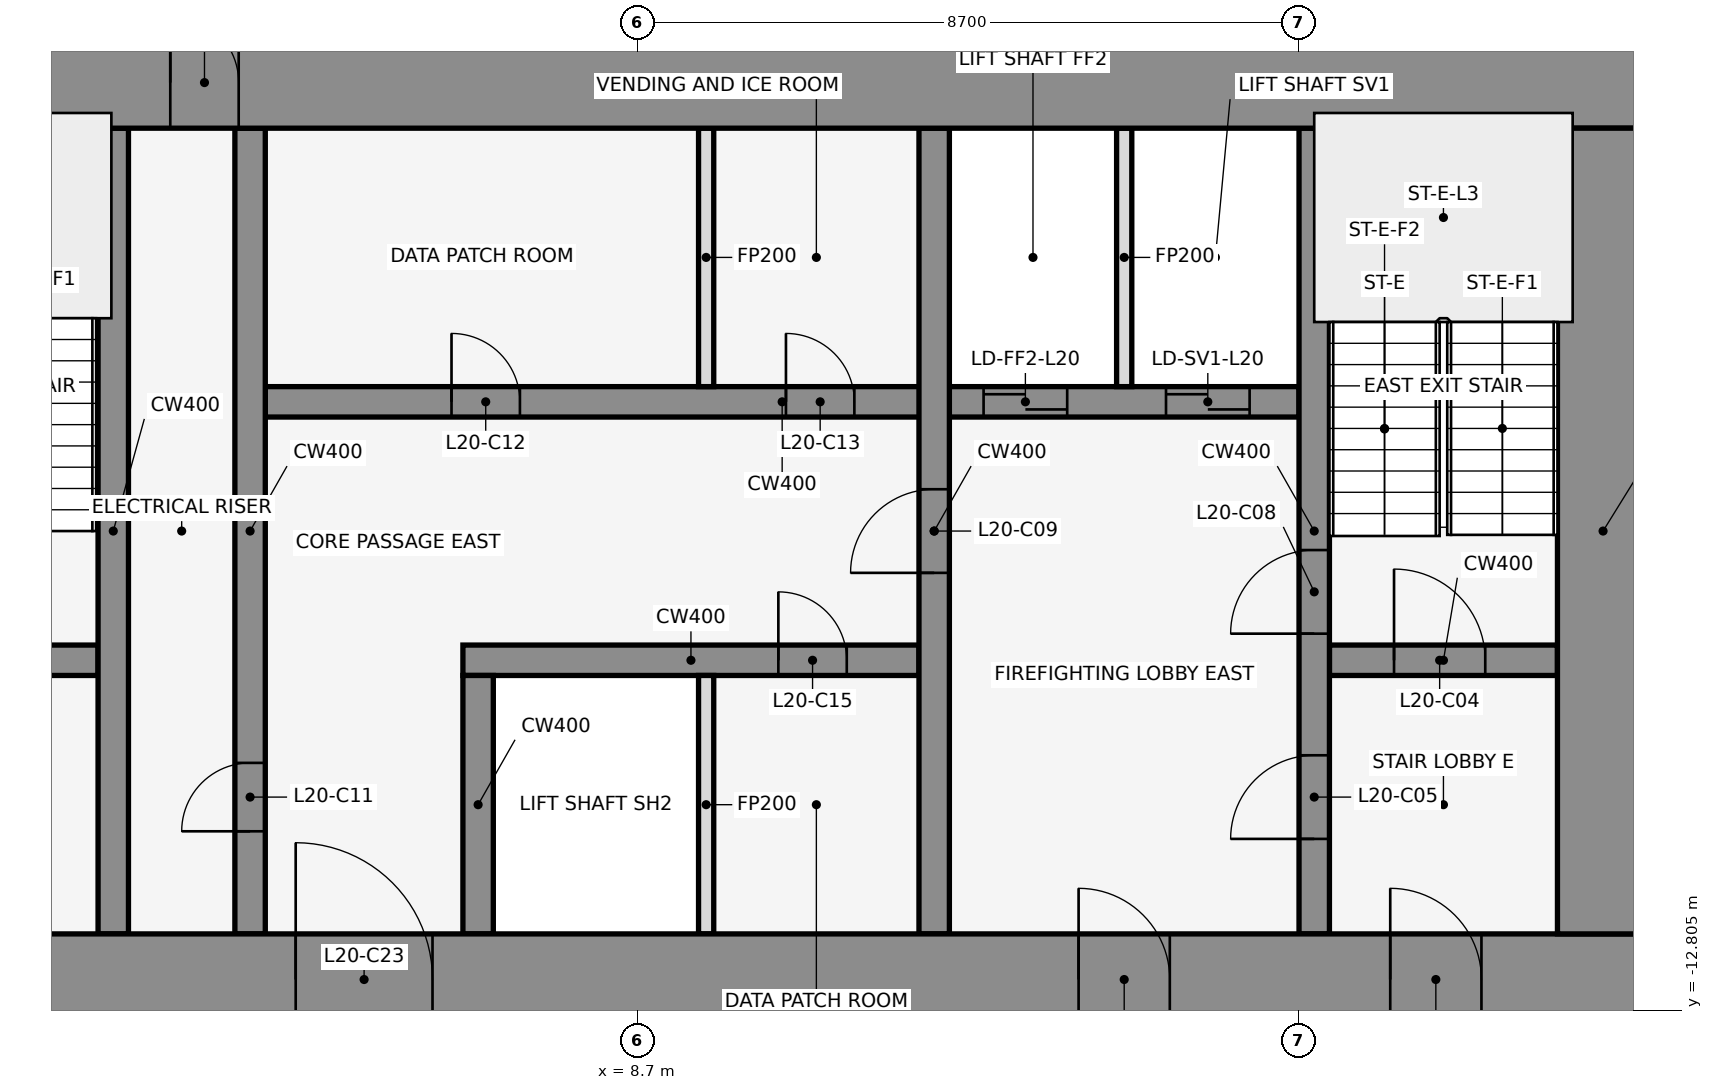
"""IFC4 building model, lengths in metres.
Left out: names, types, materials, properties, quantities, classifications, styles, units other than length and angle.
Written with IfcOpenShell. Run it as: python <this file> out.ifc"""

import sys

from ifc_helpers import new_model, si_unit, direction, frame, frame_2d, origin, place, context, subcontext, project, spatial, rectangle, extrude, element, fill, save


model = new_model("IFC4")
c1 = context("Model", 3, precision=1e-05, world=origin(), true_north=direction((0.0, 1.0)))
c2 = subcontext(c1, "Body", "Model", "MODEL_VIEW")
j1 = project(units=[si_unit("LENGTHUNIT", "METRE"), si_unit("PLANEANGLEUNIT", "RADIAN")], contexts=[c1])
p1 = place(None, origin())
s1 = spatial("IfcSite", under=j1, at=p1, CompositionType="ELEMENT")
p2 = place(p1, origin())
s2 = spatial("IfcBuilding", under=s1, at=p2, CompositionType="ELEMENT")
p3 = place(p2, frame((0.0, 0.0, 98.1)))
s3 = spatial("IfcBuildingStorey", under=s2, at=p3, CompositionType="ELEMENT", Elevation=98.1)
for number, where, z_axis, x_axis in (
    (1, (16.432, -0.105, 0.0), (0.0, 0.0, 1.0), (-0.84, 0.543, 0.0)),
    (2, (1.901, 1.08, 0.0), (0.0, 0.0, 1.0), (-0.84, -0.543, 0.0)),
):
    element("IfcWall", number, at=place(p3, frame(where, z_axis=z_axis, x_axis=x_axis)), inside=s3, PredefinedType="STANDARD", context=c2, shape_type="SweptSolid", body=[
        extrude(rectangle(XDim=2.183, YDim=0.25, at=frame_2d((1.091, 0.0))), origin(), (0.0, 0.0, 1.0), 3.95),
    ])
p4 = place(p3, frame((-1.6, -8.2, 0.0), z_axis=(0.0, 0.0, 1.0), x_axis=(1.0, 0.0, 0.0)))
e3 = element("IfcWall", 3, at=p4, inside=s3, PredefinedType="SHEAR", context=c2, shape_type="SweptSolid", body=[
    extrude(rectangle(XDim=3.2, YDim=0.4, at=frame_2d((1.6, 0.0))), origin(), (0.0, 0.0, 1.0), 4.1),
])
p5 = place(p4, frame((1.05, 0.0, 0.0)))
e4 = element("IfcOpeningElement", 4, at=p5, cuts=e3, PredefinedType="OPENING", context=c2, shape_type="SweptSolid", body=[
    extrude(rectangle(XDim=1.2, YDim=2.1, at=frame_2d((0.6, 1.05))), frame((0.0, 0.212, 0.0), z_axis=(0.0, -1.0, 0.0), x_axis=(1.0, 0.0, 0.0)), (0.0, 0.0, 1.0), 0.424),
])
p6 = place(p3, frame((6.4, -8.2, 0.0), z_axis=(0.0, 0.0, 1.0), x_axis=(1.0, 0.0, 0.0)))
e5 = element("IfcWall", 5, at=p6, inside=s3, PredefinedType="SHEAR", context=c2, shape_type="SweptSolid", body=[
    extrude(rectangle(XDim=6.0, YDim=0.4, at=frame_2d((3.0, 0.0))), origin(), (0.0, 0.0, 1.0), 4.1),
])
p7 = place(p6, frame((4.15, 0.0, 0.0)))
e6 = element("IfcOpeningElement", 6, at=p7, cuts=e5, PredefinedType="OPENING", context=c2, shape_type="SweptSolid", body=[
    extrude(rectangle(XDim=0.9, YDim=2.1, at=frame_2d((0.45, 1.05))), frame((0.0, 0.212, 0.0), z_axis=(0.0, -1.0, 0.0), x_axis=(1.0, 0.0, 0.0)), (0.0, 0.0, 1.0), 0.424),
])
p8 = place(p3, frame((17.8, -8.2, 0.0), z_axis=(0.0, 0.0, 1.0), x_axis=(1.0, 0.0, 0.0)))
e7 = element("IfcWall", 7, at=p8, inside=s3, PredefinedType="SHEAR", context=c2, shape_type="SweptSolid", body=[
    extrude(rectangle(XDim=3.0, YDim=0.4, at=frame_2d((1.5, 0.0))), origin(), (0.0, 0.0, 1.0), 4.1),
])
p9 = place(p8, frame((0.85, 0.0, 0.0)))
e8 = element("IfcOpeningElement", 8, at=p9, cuts=e7, PredefinedType="OPENING", context=c2, shape_type="SweptSolid", body=[
    extrude(rectangle(XDim=1.2, YDim=2.1, at=frame_2d((0.6, 1.05))), frame((0.0, 0.212, 0.0), z_axis=(0.0, -1.0, 0.0), x_axis=(1.0, 0.0, 0.0)), (0.0, 0.0, 1.0), 0.424),
])
p10 = place(p3, frame((3.8, -4.8, 0.0), z_axis=(0.0, 0.0, 1.0), x_axis=(1.0, 0.0, 0.0)))
e9 = element("IfcWall", 9, at=p10, inside=s3, PredefinedType="SHEAR", context=c2, shape_type="SweptSolid", body=[
    extrude(rectangle(XDim=13.6, YDim=0.4, at=frame_2d((6.8, 0.0))), origin(), (0.0, 0.0, 1.0), 4.1),
])
p11 = place(p10, frame((9.45, 0.0, 0.0)))
e10 = element("IfcOpeningElement", 10, at=p11, cuts=e9, PredefinedType="OPENING", context=c2, shape_type="SweptSolid", body=[
    extrude(rectangle(XDim=1.1, YDim=2.1, at=frame_2d((0.55, 1.05))), frame((0.0, 0.212, 0.0), z_axis=(0.0, -1.0, 0.0), x_axis=(1.0, 0.0, 0.0)), (0.0, 0.0, 1.0), 0.424),
])
p12 = place(p10, frame((11.85, 0.0, 0.0)))
e11 = element("IfcOpeningElement", 11, at=p12, cuts=e9, PredefinedType="OPENING", context=c2, shape_type="SweptSolid", body=[
    extrude(rectangle(XDim=1.1, YDim=2.1, at=frame_2d((0.55, 1.05))), frame((0.0, 0.212, 0.0), z_axis=(0.0, -1.0, 0.0), x_axis=(1.0, 0.0, 0.0)), (0.0, 0.0, 1.0), 0.424),
])
p13 = place(p10, frame((2.45, 0.0, 0.0)))
e12 = element("IfcOpeningElement", 12, at=p13, cuts=e9, PredefinedType="OPENING", context=c2, shape_type="SweptSolid", body=[
    extrude(rectangle(XDim=0.9, YDim=2.1, at=frame_2d((0.45, 1.05))), frame((0.0, 0.212, 0.0), z_axis=(0.0, -1.0, 0.0), x_axis=(1.0, 0.0, 0.0)), (0.0, 0.0, 1.0), 0.424),
])
p14 = place(p10, frame((6.85, 0.0, 0.0)))
e13 = element("IfcOpeningElement", 13, at=p14, cuts=e9, PredefinedType="OPENING", context=c2, shape_type="SweptSolid", body=[
    extrude(rectangle(XDim=0.9, YDim=2.1, at=frame_2d((0.45, 1.05))), frame((0.0, 0.212, 0.0), z_axis=(0.0, -1.0, 0.0), x_axis=(1.0, 0.0, 0.0)), (0.0, 0.0, 1.0), 0.424),
])
p15 = place(p3, frame((1.8, -11.8, 0.0), z_axis=(0.0, 0.0, 1.0), x_axis=(0.0, 1.0, 0.0)))
e14 = element("IfcWall", 14, at=p15, inside=s3, PredefinedType="SHEAR", context=c2, shape_type="SweptSolid", body=[
    extrude(rectangle(XDim=10.6, YDim=0.4, at=frame_2d((5.3, 0.0))), origin(), (0.0, 0.0, 1.0), 4.1),
])
p16 = place(p3, frame((3.6, -11.8, 0.0), z_axis=(0.0, 0.0, 1.0), x_axis=(0.0, 1.0, 0.0)))
e15 = element("IfcWall", 15, at=p16, inside=s3, PredefinedType="SHEAR", context=c2, shape_type="SweptSolid", body=[
    extrude(rectangle(XDim=10.6, YDim=0.4, at=frame_2d((5.3, 0.0))), origin(), (0.0, 0.0, 1.0), 4.1),
])
p17 = place(p16, frame((1.35, 0.0, 0.0)))
e16 = element("IfcOpeningElement", 16, at=p17, cuts=e15, PredefinedType="OPENING", context=c2, shape_type="SweptSolid", body=[
    extrude(rectangle(XDim=0.9, YDim=2.1, at=frame_2d((0.45, 1.05))), frame((0.0, 0.212, 0.0), z_axis=(0.0, -1.0, 0.0), x_axis=(1.0, 0.0, 0.0)), (0.0, 0.0, 1.0), 0.424),
])
p18 = place(p3, frame((6.6, -11.8, 0.0), z_axis=(0.0, 0.0, 1.0), x_axis=(0.0, 1.0, 0.0)))
e17 = element("IfcWall", 17, at=p18, inside=s3, PredefinedType="SHEAR", context=c2, shape_type="SweptSolid", body=[
    extrude(rectangle(XDim=3.4, YDim=0.4, at=frame_2d((1.7, 0.0))), origin(), (0.0, 0.0, 1.0), 4.1),
])
for number, where, z_axis, x_axis in (
    (18, (9.6, -11.8, 0.0), (0.0, 0.0, 1.0), (0.0, 1.0, 0.0)),
    (19, (9.6, -4.6, 0.0), (0.0, 0.0, 1.0), (0.0, 1.0, 0.0)),
):
    element("IfcWall", number, at=place(p3, frame(where, z_axis=z_axis, x_axis=x_axis)), inside=s3, PredefinedType="PARTITIONING", context=c2, shape_type="SweptSolid", body=[
        extrude(rectangle(XDim=3.4, YDim=0.2, at=frame_2d((1.7, 0.0))), origin(), (0.0, 0.0, 1.0), 3.018),
    ])
p19 = place(p3, frame((12.6, -11.8, 0.0), z_axis=(0.0, 0.0, 1.0), x_axis=(0.0, 1.0, 0.0)))
e20 = element("IfcWall", 20, at=p19, inside=s3, PredefinedType="SHEAR", context=c2, shape_type="SweptSolid", body=[
    extrude(rectangle(XDim=10.6, YDim=0.4, at=frame_2d((5.3, 0.0))), origin(), (0.0, 0.0, 1.0), 4.1),
])
p20 = place(p19, frame((4.75, 0.0, 0.0)))
e21 = element("IfcOpeningElement", 21, at=p20, cuts=e20, PredefinedType="OPENING", context=c2, shape_type="SweptSolid", body=[
    extrude(rectangle(XDim=1.1, YDim=2.1, at=frame_2d((0.55, 1.05))), frame((0.0, 0.212, 0.0), z_axis=(0.0, -1.0, 0.0), x_axis=(1.0, 0.0, 0.0)), (0.0, 0.0, 1.0), 0.424),
])
p21 = place(p3, frame((15.1, -4.6, 0.0), z_axis=(0.0, 0.0, 1.0), x_axis=(0.0, 1.0, 0.0)))
e22 = element("IfcWall", 22, at=p21, inside=s3, PredefinedType="PARTITIONING", context=c2, shape_type="SweptSolid", body=[
    extrude(rectangle(XDim=3.4, YDim=0.2, at=frame_2d((1.7, 0.0))), origin(), (0.0, 0.0, 1.0), 3.018),
])
p22 = place(p3, frame((17.6, -11.8, 0.0), z_axis=(0.0, 0.0, 1.0), x_axis=(0.0, 1.0, 0.0)))
e23 = element("IfcWall", 23, at=p22, inside=s3, PredefinedType="SHEAR", context=c2, shape_type="SweptSolid", body=[
    extrude(rectangle(XDim=10.6, YDim=0.4, at=frame_2d((5.3, 0.0))), origin(), (0.0, 0.0, 1.0), 4.1),
])
p23 = place(p22, frame((1.25, 0.0, 0.0)))
e24 = element("IfcOpeningElement", 24, at=p23, cuts=e23, PredefinedType="OPENING", context=c2, shape_type="SweptSolid", body=[
    extrude(rectangle(XDim=1.1, YDim=2.1, at=frame_2d((0.55, 1.05))), frame((0.0, 0.212, 0.0), z_axis=(0.0, -1.0, 0.0), x_axis=(1.0, 0.0, 0.0)), (0.0, 0.0, 1.0), 0.424),
])
p24 = place(p22, frame((3.95, 0.0, 0.0)))
e25 = element("IfcOpeningElement", 25, at=p24, cuts=e23, PredefinedType="OPENING", context=c2, shape_type="SweptSolid", body=[
    extrude(rectangle(XDim=1.1, YDim=2.1, at=frame_2d((0.55, 1.05))), frame((0.0, 0.212, 0.0), z_axis=(0.0, -1.0, 0.0), x_axis=(1.0, 0.0, 0.0)), (0.0, 0.0, 1.0), 0.424),
])
p25 = place(p3, frame((-22.0, -0.6, 0.0), z_axis=(0.0, 0.0, 1.0), x_axis=(1.0, 0.0, 0.0)))
e26 = element("IfcWall", 26, at=p25, inside=s3, PredefinedType="SHEAR", context=c2, shape_type="SweptSolid", body=[
    extrude(rectangle(XDim=44.0, YDim=1.2, at=frame_2d((22.0, 0.0))), origin(), (0.0, 0.0, 1.0), 4.1),
])
p26 = place(p25, frame((18.55, 0.0, 0.0)))
e27 = element("IfcOpeningElement", 27, at=p26, cuts=e26, PredefinedType="OPENING", context=c2, shape_type="SweptSolid", body=[
    extrude(rectangle(XDim=0.9, YDim=2.1, at=frame_2d((0.45, 1.05))), frame((0.0, 0.612, 0.0), z_axis=(0.0, -1.0, 0.0), x_axis=(1.0, 0.0, 0.0)), (0.0, 0.0, 1.0), 1.224),
])
p27 = place(p25, frame((24.55, 0.0, 0.0)))
e28 = element("IfcOpeningElement", 28, at=p27, cuts=e26, PredefinedType="OPENING", context=c2, shape_type="SweptSolid", body=[
    extrude(rectangle(XDim=0.9, YDim=2.1, at=frame_2d((0.45, 1.05))), frame((0.0, 0.612, 0.0), z_axis=(0.0, -1.0, 0.0), x_axis=(1.0, 0.0, 0.0)), (0.0, 0.0, 1.0), 1.224),
])
p28 = place(p3, frame((-22.0, -12.4, 0.0), z_axis=(0.0, 0.0, 1.0), x_axis=(1.0, 0.0, 0.0)))
e29 = element("IfcWall", 29, at=p28, inside=s3, PredefinedType="SHEAR", context=c2, shape_type="SweptSolid", body=[
    extrude(rectangle(XDim=44.0, YDim=1.2, at=frame_2d((22.0, 0.0))), origin(), (0.0, 0.0, 1.0), 4.1),
])
p29 = place(p28, frame((2.2, 0.0, 0.0)))
e30 = element("IfcOpeningElement", 30, at=p29, cuts=e29, PredefinedType="OPENING", context=c2, shape_type="SweptSolid", body=[
    extrude(rectangle(XDim=1.2, YDim=2.1, at=frame_2d((0.6, 1.05))), frame((0.0, 0.612, 0.0), z_axis=(0.0, -1.0, 0.0), x_axis=(1.0, 0.0, 0.0)), (0.0, 0.0, 1.0), 1.224),
])
p30 = place(p28, frame((21.4, 0.0, 0.0)))
e31 = element("IfcOpeningElement", 31, at=p30, cuts=e29, PredefinedType="OPENING", context=c2, shape_type="SweptSolid", body=[
    extrude(rectangle(XDim=1.2, YDim=2.1, at=frame_2d((0.6, 1.05))), frame((0.0, 0.612, 0.0), z_axis=(0.0, -1.0, 0.0), x_axis=(1.0, 0.0, 0.0)), (0.0, 0.0, 1.0), 1.224),
])
p31 = place(p28, frame((40.6, 0.0, 0.0)))
e32 = element("IfcOpeningElement", 32, at=p31, cuts=e29, PredefinedType="OPENING", context=c2, shape_type="SweptSolid", body=[
    extrude(rectangle(XDim=1.2, YDim=2.1, at=frame_2d((0.6, 1.05))), frame((0.0, 0.612, 0.0), z_axis=(0.0, -1.0, 0.0), x_axis=(1.0, 0.0, 0.0)), (0.0, 0.0, 1.0), 1.224),
])
p32 = place(p28, frame((16.0, 0.0, 0.0)))
e33 = element("IfcOpeningElement", 33, at=p32, cuts=e29, PredefinedType="OPENING", context=c2, shape_type="SweptSolid", body=[
    extrude(rectangle(XDim=1.8, YDim=2.1, at=frame_2d((0.9, 1.05))), frame((0.0, 0.612, 0.0), z_axis=(0.0, -1.0, 0.0), x_axis=(1.0, 0.0, 0.0)), (0.0, 0.0, 1.0), 1.224),
])
p33 = place(p28, frame((6.3, 0.0, 0.0)))
e34 = element("IfcOpeningElement", 34, at=p33, cuts=e29, PredefinedType="OPENING", context=c2, shape_type="SweptSolid", body=[
    extrude(rectangle(XDim=1.2, YDim=2.1, at=frame_2d((0.6, 1.05))), frame((0.0, 0.612, 0.0), z_axis=(0.0, -1.0, 0.0), x_axis=(1.0, 0.0, 0.0)), (0.0, 0.0, 1.0), 1.224),
])
p34 = place(p28, frame((26.2, 0.0, 0.0)))
e35 = element("IfcOpeningElement", 35, at=p34, cuts=e29, PredefinedType="OPENING", context=c2, shape_type="SweptSolid", body=[
    extrude(rectangle(XDim=1.8, YDim=2.1, at=frame_2d((0.9, 1.05))), frame((0.0, 0.612, 0.0), z_axis=(0.0, -1.0, 0.0), x_axis=(1.0, 0.0, 0.0)), (0.0, 0.0, 1.0), 1.224),
])
p35 = place(p28, frame((36.5, 0.0, 0.0)))
e36 = element("IfcOpeningElement", 36, at=p35, cuts=e29, PredefinedType="OPENING", context=c2, shape_type="SweptSolid", body=[
    extrude(rectangle(XDim=1.2, YDim=2.1, at=frame_2d((0.6, 1.05))), frame((0.0, 0.612, 0.0), z_axis=(0.0, -1.0, 0.0), x_axis=(1.0, 0.0, 0.0)), (0.0, 0.0, 1.0), 1.224),
])
p36 = place(p3, frame((21.4, -11.8, 0.0), z_axis=(0.0, 0.0, 1.0), x_axis=(0.0, 1.0, 0.0)))
e37 = element("IfcWall", 37, at=p36, inside=s3, PredefinedType="SHEAR", context=c2, shape_type="SweptSolid", body=[
    extrude(rectangle(XDim=10.6, YDim=1.2, at=frame_2d((5.3, 0.0))), origin(), (0.0, 0.0, 1.0), 4.1),
])
p37 = place(p9, origin())
e38 = element("IfcDoor", 38, at=p37, inside=s3, OperationType="SINGLE_SWING_RIGHT", PredefinedType="DOOR", context=c2, shape_type="SweptSolid", body=[
    extrude(rectangle(XDim=1.2, YDim=2.1, at=frame_2d((0.6, 1.05))), frame((0.0, 0.025, 0.0), z_axis=(0.0, -1.0, 0.0), x_axis=(1.0, 0.0, 0.0)), (0.0, 0.0, 1.0), 0.05),
])
fill(e8, e38)
p38 = place(p23, origin())
e39 = element("IfcDoor", 39, at=p38, inside=s3, OperationType="SINGLE_SWING_LEFT", PredefinedType="DOOR", context=c2, shape_type="SweptSolid", body=[
    extrude(rectangle(XDim=1.1, YDim=2.1, at=frame_2d((0.55, 1.05))), frame((0.0, 0.025, 0.0), z_axis=(0.0, -1.0, 0.0), x_axis=(1.0, 0.0, 0.0)), (0.0, 0.0, 1.0), 0.05),
])
fill(e24, e39)
p39 = place(p11, origin())
e40 = element("IfcDoor", 40, at=p39, inside=s3, OperationType="DOUBLE_DOOR_SLIDING", PredefinedType="DOOR", context=c2, shape_type="SweptSolid", body=[
    extrude(rectangle(XDim=1.1, YDim=2.1, at=frame_2d((0.55, 1.05))), frame((0.0, 0.025, 0.0), z_axis=(0.0, -1.0, 0.0), x_axis=(1.0, 0.0, 0.0)), (0.0, 0.0, 1.0), 0.05),
])
fill(e10, e40)
p40 = place(p12, origin())
e41 = element("IfcDoor", 41, at=p40, inside=s3, OperationType="DOUBLE_DOOR_SLIDING", PredefinedType="DOOR", context=c2, shape_type="SweptSolid", body=[
    extrude(rectangle(XDim=1.1, YDim=2.1, at=frame_2d((0.55, 1.05))), frame((0.0, 0.025, 0.0), z_axis=(0.0, -1.0, 0.0), x_axis=(1.0, 0.0, 0.0)), (0.0, 0.0, 1.0), 0.05),
])
fill(e11, e41)
p41 = place(p24, origin())
e42 = element("IfcDoor", 42, at=p41, inside=s3, OperationType="SINGLE_SWING_RIGHT", PredefinedType="DOOR", context=c2, shape_type="SweptSolid", body=[
    extrude(rectangle(XDim=1.1, YDim=2.1, at=frame_2d((0.55, 1.05))), frame((0.0, 0.025, 0.0), z_axis=(0.0, -1.0, 0.0), x_axis=(1.0, 0.0, 0.0)), (0.0, 0.0, 1.0), 0.05),
])
fill(e25, e42)
p42 = place(p20, frame((1.1, 0.0, 0.0), z_axis=(0.0, 0.0, 1.0), x_axis=(-1.0, 0.0, 0.0)))
e43 = element("IfcDoor", 43, at=p42, inside=s3, OperationType="SINGLE_SWING_RIGHT", PredefinedType="DOOR", context=c2, shape_type="SweptSolid", body=[
    extrude(rectangle(XDim=1.1, YDim=2.1, at=frame_2d((0.55, 1.05))), frame((0.0, 0.025, 0.0), z_axis=(0.0, -1.0, 0.0), x_axis=(1.0, 0.0, 0.0)), (0.0, 0.0, 1.0), 0.05),
])
fill(e21, e43)
p43 = place(p17, origin())
e44 = element("IfcDoor", 44, at=p43, inside=s3, OperationType="SINGLE_SWING_LEFT", PredefinedType="DOOR", context=c2, shape_type="SweptSolid", body=[
    extrude(rectangle(XDim=0.9, YDim=2.1, at=frame_2d((0.45, 1.05))), frame((0.0, 0.025, 0.0), z_axis=(0.0, -1.0, 0.0), x_axis=(1.0, 0.0, 0.0)), (0.0, 0.0, 1.0), 0.05),
])
fill(e16, e44)
p44 = place(p13, origin())
e45 = element("IfcDoor", 45, at=p44, inside=s3, OperationType="SINGLE_SWING_RIGHT", PredefinedType="DOOR", context=c2, shape_type="SweptSolid", body=[
    extrude(rectangle(XDim=0.9, YDim=2.1, at=frame_2d((0.45, 1.05))), frame((0.0, 0.025, 0.0), z_axis=(0.0, -1.0, 0.0), x_axis=(1.0, 0.0, 0.0)), (0.0, 0.0, 1.0), 0.05),
])
fill(e12, e45)
p45 = place(p14, origin())
e46 = element("IfcDoor", 46, at=p45, inside=s3, OperationType="SINGLE_SWING_LEFT", PredefinedType="DOOR", context=c2, shape_type="SweptSolid", body=[
    extrude(rectangle(XDim=0.9, YDim=2.1, at=frame_2d((0.45, 1.05))), frame((0.0, 0.025, 0.0), z_axis=(0.0, -1.0, 0.0), x_axis=(1.0, 0.0, 0.0)), (0.0, 0.0, 1.0), 0.05),
])
fill(e13, e46)
p46 = place(p7, frame((0.9, 0.0, 0.0), z_axis=(0.0, 0.0, 1.0), x_axis=(-1.0, 0.0, 0.0)))
e47 = element("IfcDoor", 47, at=p46, inside=s3, OperationType="SINGLE_SWING_RIGHT", PredefinedType="DOOR", context=c2, shape_type="SweptSolid", body=[
    extrude(rectangle(XDim=0.9, YDim=2.1, at=frame_2d((0.45, 1.05))), frame((0.0, 0.025, 0.0), z_axis=(0.0, -1.0, 0.0), x_axis=(1.0, 0.0, 0.0)), (0.0, 0.0, 1.0), 0.05),
])
fill(e6, e47)
p47 = place(p27, origin())
e48 = element("IfcDoor", 48, at=p47, inside=s3, OperationType="SINGLE_SWING_LEFT", PredefinedType="DOOR", context=c2, shape_type="SweptSolid", body=[
    extrude(rectangle(XDim=0.9, YDim=2.1, at=frame_2d((0.45, 1.05))), frame((0.0, 0.025, 0.0), z_axis=(0.0, -1.0, 0.0), x_axis=(1.0, 0.0, 0.0)), (0.0, 0.0, 1.0), 0.05),
])
fill(e28, e48)
p48 = place(p31, frame((1.2, 0.0, 0.0), z_axis=(0.0, 0.0, 1.0), x_axis=(-1.0, 0.0, 0.0)))
e49 = element("IfcDoor", 49, at=p48, inside=s3, OperationType="SINGLE_SWING_RIGHT", PredefinedType="DOOR", context=c2, shape_type="SweptSolid", body=[
    extrude(rectangle(XDim=1.2, YDim=2.1, at=frame_2d((0.6, 1.05))), frame((0.0, 0.025, 0.0), z_axis=(0.0, -1.0, 0.0), x_axis=(1.0, 0.0, 0.0)), (0.0, 0.0, 1.0), 0.05),
])
fill(e32, e49)
p49 = place(p34, origin())
e50 = element("IfcDoor", 50, at=p49, inside=s3, OperationType="SINGLE_SWING_LEFT", PredefinedType="DOOR", context=c2, shape_type="SweptSolid", body=[
    extrude(rectangle(XDim=1.8, YDim=2.1, at=frame_2d((0.9, 1.05))), frame((0.0, 0.025, 0.0), z_axis=(0.0, -1.0, 0.0), x_axis=(1.0, 0.0, 0.0)), (0.0, 0.0, 1.0), 0.05),
])
fill(e35, e50)
p50 = place(p35, frame((1.2, 0.0, 0.0), z_axis=(0.0, 0.0, 1.0), x_axis=(-1.0, 0.0, 0.0)))
e51 = element("IfcDoor", 51, at=p50, inside=s3, OperationType="SINGLE_SWING_RIGHT", PredefinedType="DOOR", context=c2, shape_type="SweptSolid", body=[
    extrude(rectangle(XDim=1.2, YDim=2.1, at=frame_2d((0.6, 1.05))), frame((0.0, 0.025, 0.0), z_axis=(0.0, -1.0, 0.0), x_axis=(1.0, 0.0, 0.0)), (0.0, 0.0, 1.0), 0.05),
])
fill(e36, e51)
save(model, sys.argv[1])
